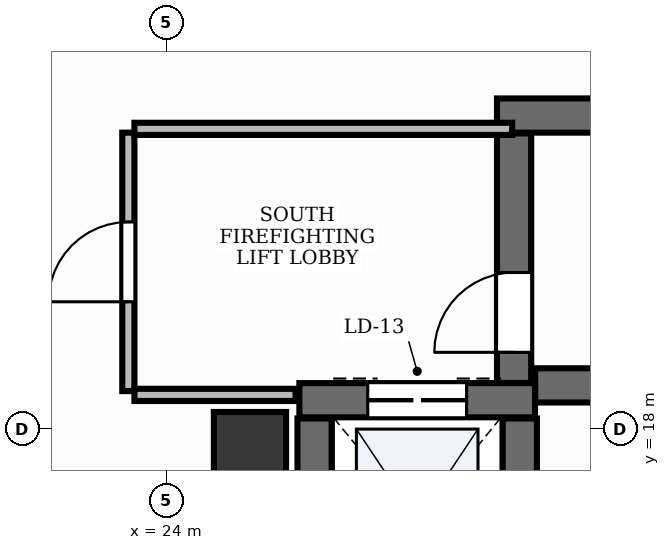
"""IFC4 building model, lengths in metres.
Left out: names, types, materials, properties, quantities, classifications, styles, units other than length and angle.
Written with IfcOpenShell. Run it as: python <this file> out.ifc"""

import sys

from ifc_helpers import new_model, si_unit, direction, frame, frame_2d, origin, origin_2d, place, context, subcontext, project, spatial, rectangle, extrude, element, fill, save


model = new_model("IFC4")
c1 = context("Model", 3, precision=1e-05, world=origin(), true_north=direction((0.0, 1.0)))
c2 = subcontext(c1, "Body", "Model", "MODEL_VIEW")
j1 = project(units=[si_unit("LENGTHUNIT", "METRE"), si_unit("PLANEANGLEUNIT", "RADIAN")], contexts=[c1])
p1 = place(None, origin())
s1 = spatial("IfcSite", under=j1, at=p1, CompositionType="ELEMENT")
p2 = place(p1, origin())
s2 = spatial("IfcBuilding", under=s1, at=p2, CompositionType="ELEMENT")
p3 = place(p2, frame((0.0, 0.0, 55.2)))
s3 = spatial("IfcBuildingStorey", under=s2, at=p3, CompositionType="ELEMENT", Elevation=55.2)
p4 = place(p3, frame((28.852, 18.575, 0.0), z_axis=(0.0, 0.0, 1.0), x_axis=(1.0, 0.0, 0.0)))
e1 = element("IfcWall", 1, at=p4, inside=s3, PredefinedType="SHEAR", context=c2, shape_type="SweptSolid", body=[
    extrude(rectangle(XDim=8.248, YDim=0.45, at=frame_2d((4.124, 0.0))), origin(), (0.0, 0.0, 1.0), 3.9),
])
p5 = place(p3, frame((28.35, 22.125, 0.0), z_axis=(0.0, 0.0, 1.0), x_axis=(1.0, 0.0, 0.0)))
e2 = element("IfcWall", 2, at=p5, inside=s3, PredefinedType="SHEAR", context=c2, shape_type="SweptSolid", body=[
    extrude(rectangle(XDim=8.75, YDim=0.45, at=frame_2d((4.375, 0.0))), origin(), (0.0, 0.0, 1.0), 3.9),
])
p6 = place(p3, frame((28.575, 18.607, 0.0), z_axis=(0.0, 0.0, 1.0), x_axis=(0.0, 1.0, 0.0)))
e3 = element("IfcWall", 3, at=p6, inside=s3, PredefinedType="SHEAR", context=c2, shape_type="SweptSolid", body=[
    extrude(rectangle(XDim=3.283, YDim=0.45, at=frame_2d((1.642, 0.0))), origin(), (0.0, 0.0, 1.0), 3.9),
])
p7 = place(p6, frame((0.403, 0.0, 0.0)))
e4 = element("IfcOpeningElement", 4, at=p7, cuts=e3, PredefinedType="OPENING", context=c2, shape_type="SweptSolid", body=[
    extrude(rectangle(XDim=1.05, YDim=2.15, at=frame_2d((0.525, 1.075))), frame((0.0, 0.24, 0.0), z_axis=(0.0, -1.0, 0.0), x_axis=(1.0, 0.0, 0.0)), (0.0, 0.0, 1.0), 0.48),
])
p8 = place(p3, frame((25.75, 18.38, 0.0), z_axis=(0.0, 0.0, 1.0), x_axis=(1.0, 0.0, 0.0)))
e5 = element("IfcWall", 5, at=p8, inside=s3, PredefinedType="SHEAR", context=c2, shape_type="SweptSolid", body=[
    extrude(rectangle(XDim=3.1, YDim=0.45, at=frame_2d((1.55, 0.0))), origin(), (0.0, 0.0, 1.0), 3.9),
])
p9 = place(p8, frame((0.9, 0.0, 0.0)))
e6 = element("IfcOpeningElement", 6, at=p9, cuts=e5, PredefinedType="OPENING", context=c2, shape_type="SweptSolid", body=[
    extrude(rectangle(XDim=1.3, YDim=2.2, at=frame_2d((0.65, 1.1))), frame((0.0, 0.24, 0.0), z_axis=(0.0, -1.0, 0.0), x_axis=(1.0, 0.0, 0.0)), (0.0, 0.0, 1.0), 0.48),
])
for number, where, z_axis, x_axis in (
    (7, (25.95, 15.44, 0.0), (0.0, 0.0, 1.0), (0.0, 1.0, 0.0)),
    (8, (28.65, 15.44, 0.0), (0.0, 0.0, 1.0), (0.0, 1.0, 0.0)),
):
    element("IfcWall", number, at=place(p3, frame(where, z_axis=z_axis, x_axis=x_axis)), inside=s3, PredefinedType="SHEAR", context=c2, shape_type="SweptSolid", body=[
        extrude(rectangle(XDim=2.7, YDim=0.45, at=frame_2d((1.35, 0.0))), origin(), (0.0, 0.0, 1.0), 3.9),
    ])
p10 = place(p3, frame((25.1, 17.75, -0.0), z_axis=(0.0, 0.0, 1.0), x_axis=(1.0, 0.0, 0.0)))
e9 = element("IfcColumn", 9, at=p10, inside=s3, PredefinedType="PILASTER", context=c2, shape_type="SweptSolid", body=[
    extrude(rectangle(XDim=0.95, YDim=0.95, at=origin_2d()), origin(), (0.0, 0.0, 1.0), 3.901),
])
p11 = place(p3, frame((23.5, 18.5, 0.0), z_axis=(0.0, 0.0, 1.0), x_axis=(0.0, 1.0, 0.0)))
e10 = element("IfcWall", 10, at=p11, inside=s3, PredefinedType="PARTITIONING", context=c2, shape_type="SweptSolid", body=[
    extrude(rectangle(XDim=3.4, YDim=0.16, at=frame_2d((1.7, 0.0))), origin(), (0.0, 0.0, 1.0), 2.91),
])
p12 = place(p11, frame((1.175, 0.0, 0.0)))
e11 = element("IfcOpeningElement", 11, at=p12, cuts=e10, PredefinedType="OPENING", context=c2, shape_type="SweptSolid", body=[
    extrude(rectangle(XDim=1.05, YDim=2.15, at=frame_2d((0.525, 1.075))), frame((0.0, 0.095, 0.0), z_axis=(0.0, -1.0, 0.0), x_axis=(1.0, 0.0, 0.0)), (0.0, 0.0, 1.0), 0.19),
])
p13 = place(p3, frame((23.58, 21.95, 0.0), z_axis=(0.0, 0.0, 1.0), x_axis=(1.0, 0.0, 0.0)))
e12 = element("IfcWall", 12, at=p13, inside=s3, PredefinedType="PARTITIONING", context=c2, shape_type="SweptSolid", body=[
    extrude(rectangle(XDim=4.97, YDim=0.16, at=frame_2d((2.485, 0.0))), origin(), (0.0, 0.0, 1.0), 2.91),
])
p14 = place(p3, frame((23.58, 18.45, 0.0), z_axis=(0.0, 0.0, 1.0), x_axis=(1.0, 0.0, 0.0)))
e13 = element("IfcWall", 13, at=p14, inside=s3, PredefinedType="PARTITIONING", context=c2, shape_type="SweptSolid", body=[
    extrude(rectangle(XDim=2.12, YDim=0.16, at=frame_2d((1.06, 0.0))), origin(), (0.0, 0.0, 1.0), 2.91),
])
p15 = place(p7, origin())
e14 = element("IfcDoor", 14, at=p15, inside=s3, OperationType="SINGLE_SWING_LEFT", PredefinedType="DOOR", context=c2, shape_type="SweptSolid", body=[
    extrude(rectangle(XDim=1.05, YDim=2.15, at=frame_2d((0.525, 1.075))), frame((0.0, 0.025, 0.0), z_axis=(0.0, -1.0, 0.0), x_axis=(1.0, 0.0, 0.0)), (0.0, 0.0, 1.0), 0.05),
])
fill(e4, e14)
p16 = place(p9, origin())
e15 = element("IfcDoor", 15, at=p16, inside=s3, OperationType="DOUBLE_DOOR_SLIDING", PredefinedType="DOOR", context=c2, shape_type="SweptSolid", body=[
    extrude(rectangle(XDim=1.3, YDim=2.2, at=frame_2d((0.65, 1.1))), frame((0.0, 0.025, 0.0), z_axis=(0.0, -1.0, 0.0), x_axis=(1.0, 0.0, 0.0)), (0.0, 0.0, 1.0), 0.05),
])
fill(e6, e15)
p17 = place(p12, origin())
e16 = element("IfcDoor", 16, at=p17, inside=s3, OperationType="SINGLE_SWING_LEFT", PredefinedType="DOOR", context=c2, shape_type="SweptSolid", body=[
    extrude(rectangle(XDim=1.05, YDim=2.15, at=frame_2d((0.525, 1.075))), frame((0.0, 0.025, 0.0), z_axis=(0.0, -1.0, 0.0), x_axis=(1.0, 0.0, 0.0)), (0.0, 0.0, 1.0), 0.05),
])
fill(e11, e16)
save(model, sys.argv[1])
